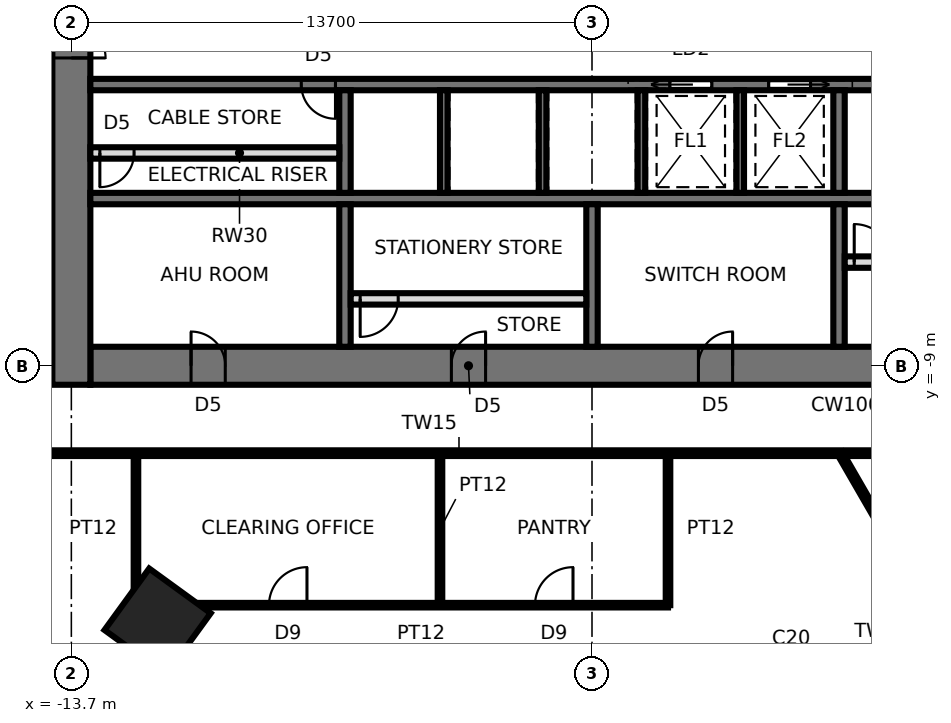
"""IFC4 building model, lengths in metres.
Left out: names, types, materials, properties, quantities, classifications, styles, units other than length and angle.
Written with IfcOpenShell. Run it as: python <this file> out.ifc"""

import sys

from ifc_helpers import new_model, si_unit, direction, frame, frame_2d, origin, origin_2d, place, context, subcontext, project, spatial, rectangle, extrude, element, fill, save


model = new_model("IFC4")
c1 = context("Model", 3, precision=1e-05, world=origin(), true_north=direction((0.0, 1.0)))
c2 = subcontext(c1, "Body", "Model", "MODEL_VIEW")
j1 = project(units=[si_unit("LENGTHUNIT", "METRE"), si_unit("PLANEANGLEUNIT", "RADIAN")], contexts=[c1])
p1 = place(None, origin())
s1 = spatial("IfcSite", under=j1, at=p1, CompositionType="ELEMENT")
p2 = place(p1, origin())
s2 = spatial("IfcBuilding", under=s1, at=p2, CompositionType="ELEMENT")
p3 = place(p2, frame((0.0, 0.0, 82.6)))
s3 = spatial("IfcBuildingStorey", under=s2, at=p3, CompositionType="ELEMENT", Elevation=82.6)
p4 = place(p3, frame((-11.43, -15.733, 0.0), z_axis=(0.0, 0.0, 1.0), x_axis=(-0.587785252292, -0.809016994375, 0.0)))
e1 = element("IfcColumn", 1, at=p4, inside=s3, PredefinedType="COLUMN", context=c2, shape_type="SweptSolid", body=[
    extrude(rectangle(XDim=2.0, YDim=2.0, at=origin_2d()), origin(), (0.0, 0.0, 1.0), 4.2),
])
p5 = place(p3, frame((-13.2, -9.0, 0.0), z_axis=(0.0, 0.0, 1.0), x_axis=(1.0, 0.0, 0.0)))
e2 = element("IfcWall", 2, at=p5, inside=s3, PredefinedType="SHEAR", context=c2, shape_type="SweptSolid", body=[
    extrude(rectangle(XDim=26.4, YDim=1.0, at=frame_2d((13.2, 0.0))), origin(), (0.0, 0.0, 1.0), 4.2),
])
p6 = place(p5, frame((2.65, 0.0, 0.0)))
e3 = element("IfcOpeningElement", 3, at=p6, cuts=e2, PredefinedType="OPENING", context=c2, shape_type="SweptSolid", body=[
    extrude(rectangle(XDim=0.9, YDim=2.1, at=frame_2d((0.45, 1.05))), frame((0.0, 0.51, 0.0), z_axis=(0.0, -1.0, 0.0), x_axis=(1.0, 0.0, 0.0)), (0.0, 0.0, 1.0), 1.02),
])
p7 = place(p5, frame((9.5, 0.0, 0.0)))
e4 = element("IfcOpeningElement", 4, at=p7, cuts=e2, PredefinedType="OPENING", context=c2, shape_type="SweptSolid", body=[
    extrude(rectangle(XDim=0.9, YDim=2.1, at=frame_2d((0.45, 1.05))), frame((0.0, 0.51, 0.0), z_axis=(0.0, -1.0, 0.0), x_axis=(1.0, 0.0, 0.0)), (0.0, 0.0, 1.0), 1.02),
])
p8 = place(p5, frame((16.0, 0.0, 0.0)))
e5 = element("IfcOpeningElement", 5, at=p8, cuts=e2, PredefinedType="OPENING", context=c2, shape_type="SweptSolid", body=[
    extrude(rectangle(XDim=0.9, YDim=2.1, at=frame_2d((0.45, 1.05))), frame((0.0, 0.51, 0.0), z_axis=(0.0, -1.0, 0.0), x_axis=(1.0, 0.0, 0.0)), (0.0, 0.0, 1.0), 1.02),
])
p9 = place(p5, frame((22.85, 0.0, 0.0)))
e6 = element("IfcOpeningElement", 6, at=p9, cuts=e2, PredefinedType="OPENING", context=c2, shape_type="SweptSolid", body=[
    extrude(rectangle(XDim=0.9, YDim=2.1, at=frame_2d((0.45, 1.05))), frame((0.0, 0.51, 0.0), z_axis=(0.0, -1.0, 0.0), x_axis=(1.0, 0.0, 0.0)), (0.0, 0.0, 1.0), 1.02),
])
p10 = place(p3, frame((-13.7, 9.5, 0.0), z_axis=(0.0, 0.0, 1.0), x_axis=(0.0, -1.0, 0.0)))
e7 = element("IfcWall", 7, at=p10, inside=s3, PredefinedType="SHEAR", context=c2, shape_type="SweptSolid", body=[
    extrude(rectangle(XDim=19.0, YDim=1.0, at=frame_2d((9.5, 0.0))), origin(), (0.0, 0.0, 1.0), 4.2),
])
p11 = place(p10, frame((8.6, 0.0, 0.0)))
e8 = element("IfcOpeningElement", 8, at=p11, cuts=e7, PredefinedType="OPENING", context=c2, shape_type="SweptSolid", body=[
    extrude(rectangle(XDim=1.8, YDim=2.4, at=frame_2d((0.9, 1.2))), frame((0.0, 0.51, 0.0), z_axis=(0.0, -1.0, 0.0), x_axis=(1.0, 0.0, 0.0)), (0.0, 0.0, 1.0), 1.02),
])
p12 = place(p3, frame((-13.2, -1.6, 0.0), z_axis=(0.0, 0.0, 1.0), x_axis=(1.0, 0.0, 0.0)))
e9 = element("IfcWall", 9, at=p12, inside=s3, PredefinedType="SHEAR", context=c2, shape_type="SweptSolid", body=[
    extrude(rectangle(XDim=26.4, YDim=0.3, at=frame_2d((13.2, 0.0))), origin(), (0.0, 0.0, 1.0), 4.2),
])
p13 = place(p12, frame((25.15, 0.0, 0.0)))
e10 = element("IfcOpeningElement", 10, at=p13, cuts=e9, PredefinedType="OPENING", context=c2, shape_type="SweptSolid", body=[
    extrude(rectangle(XDim=1.0, YDim=2.1, at=frame_2d((0.5, 1.05))), frame((0.0, 0.16, 0.0), z_axis=(0.0, -1.0, 0.0), x_axis=(1.0, 0.0, 0.0)), (0.0, 0.0, 1.0), 0.32),
])
p14 = place(p12, frame((15.25, 0.0, 0.0)))
e11 = element("IfcOpeningElement", 11, at=p14, cuts=e9, PredefinedType="OPENING", context=c2, shape_type="SweptSolid", body=[
    extrude(rectangle(XDim=1.1, YDim=2.3, at=frame_2d((0.55, 1.15))), frame((0.0, 0.16, 0.0), z_axis=(0.0, -1.0, 0.0), x_axis=(1.0, 0.0, 0.0)), (0.0, 0.0, 1.0), 0.32),
])
p15 = place(p12, frame((17.85, 0.0, 0.0)))
e12 = element("IfcOpeningElement", 12, at=p15, cuts=e9, PredefinedType="OPENING", context=c2, shape_type="SweptSolid", body=[
    extrude(rectangle(XDim=1.1, YDim=2.3, at=frame_2d((0.55, 1.15))), frame((0.0, 0.16, 0.0), z_axis=(0.0, -1.0, 0.0), x_axis=(1.0, 0.0, 0.0)), (0.0, 0.0, 1.0), 0.32),
])
p16 = place(p12, frame((5.55, 0.0, 0.0)))
e13 = element("IfcOpeningElement", 13, at=p16, cuts=e9, PredefinedType="OPENING", context=c2, shape_type="SweptSolid", body=[
    extrude(rectangle(XDim=0.9, YDim=2.1, at=frame_2d((0.45, 1.05))), frame((0.0, 0.16, 0.0), z_axis=(0.0, -1.0, 0.0), x_axis=(1.0, 0.0, 0.0)), (0.0, 0.0, 1.0), 0.32),
])
p17 = place(p3, frame((-13.2, -4.6, 0.0), z_axis=(0.0, 0.0, 1.0), x_axis=(1.0, 0.0, 0.0)))
e14 = element("IfcWall", 14, at=p17, inside=s3, PredefinedType="SHEAR", context=c2, shape_type="SweptSolid", body=[
    extrude(rectangle(XDim=26.4, YDim=0.3, at=frame_2d((13.2, 0.0))), origin(), (0.0, 0.0, 1.0), 4.2),
])
p18 = place(p3, frame((-6.5, -1.75, 0.0), z_axis=(0.0, 0.0, 1.0), x_axis=(0.0, -1.0, 0.0)))
e15 = element("IfcWall", 15, at=p18, inside=s3, PredefinedType="SHEAR", context=c2, shape_type="SweptSolid", body=[
    extrude(rectangle(XDim=2.7, YDim=0.3, at=frame_2d((1.35, 0.0))), origin(), (0.0, 0.0, 1.0), 4.2),
])
p19 = place(p3, frame((-6.5, -4.75, 0.0), z_axis=(0.0, 0.0, 1.0), x_axis=(0.0, -1.0, 0.0)))
e16 = element("IfcWall", 16, at=p19, inside=s3, PredefinedType="SHEAR", context=c2, shape_type="SweptSolid", body=[
    extrude(rectangle(XDim=3.75, YDim=0.3, at=frame_2d((1.875, 0.0))), origin(), (0.0, 0.0, 1.0), 4.2),
])
p20 = place(p3, frame((6.5, -1.75, 0.0), z_axis=(0.0, 0.0, 1.0), x_axis=(0.0, -1.0, 0.0)))
e17 = element("IfcWall", 17, at=p20, inside=s3, PredefinedType="SHEAR", context=c2, shape_type="SweptSolid", body=[
    extrude(rectangle(XDim=2.7, YDim=0.3, at=frame_2d((1.35, 0.0))), origin(), (0.0, 0.0, 1.0), 4.2),
])
p21 = place(p3, frame((6.5, -4.75, 0.0), z_axis=(0.0, 0.0, 1.0), x_axis=(0.0, -1.0, 0.0)))
e18 = element("IfcWall", 18, at=p21, inside=s3, PredefinedType="SHEAR", context=c2, shape_type="SweptSolid", body=[
    extrude(rectangle(XDim=3.75, YDim=0.3, at=frame_2d((1.875, 0.0))), origin(), (0.0, 0.0, 1.0), 4.2),
])
for number, where, z_axis, x_axis in (
    (19, (-3.9, -1.75, 0.0), (0.0, 0.0, 1.0), (0.0, -1.0, 0.0)),
    (20, (-1.3, -1.75, 0.0), (0.0, 0.0, 1.0), (0.0, -1.0, 0.0)),
    (21, (1.3, -1.75, 0.0), (0.0, 0.0, 1.0), (0.0, -1.0, 0.0)),
    (22, (3.9, -1.75, 0.0), (0.0, 0.0, 1.0), (0.0, -1.0, 0.0)),
):
    element("IfcWall", number, at=place(p3, frame(where, z_axis=z_axis, x_axis=x_axis)), inside=s3, PredefinedType="SHEAR", context=c2, shape_type="SweptSolid", body=[
        extrude(rectangle(XDim=2.7, YDim=0.2, at=frame_2d((1.35, 0.0))), origin(), (0.0, 0.0, 1.0), 4.2),
    ])
p22 = place(p3, frame((0.0, -4.75, 0.0), z_axis=(0.0, 0.0, 1.0), x_axis=(0.0, -1.0, 0.0)))
e23 = element("IfcWall", 23, at=p22, inside=s3, PredefinedType="SHEAR", context=c2, shape_type="SweptSolid", body=[
    extrude(rectangle(XDim=3.75, YDim=0.3, at=frame_2d((1.875, 0.0))), origin(), (0.0, 0.0, 1.0), 4.2),
])
p23 = place(p3, frame((-6.35, -7.24, 0.0), z_axis=(0.0, 0.0, 1.0), x_axis=(1.0, 0.0, 0.0)))
e24 = element("IfcWall", 24, at=p23, inside=s3, PredefinedType="PARTITIONING", context=c2, shape_type="SweptSolid", body=[
    extrude(rectangle(XDim=6.2, YDim=0.3, at=frame_2d((3.1, 0.0))), origin(), (0.0, 0.0, 1.0), 4.0),
])
p24 = place(p23, frame((0.25, 0.0, 0.0)))
e25 = element("IfcOpeningElement", 25, at=p24, cuts=e24, PredefinedType="OPENING", context=c2, shape_type="SweptSolid", body=[
    extrude(rectangle(XDim=1.0, YDim=2.4, at=frame_2d((0.5, 1.2))), frame((0.0, 0.16, 0.0), z_axis=(0.0, -1.0, 0.0), x_axis=(1.0, 0.0, 0.0)), (0.0, 0.0, 1.0), 0.32),
])
p25 = place(p3, frame((6.65, -6.272, 0.0), z_axis=(0.0, 0.0, 1.0), x_axis=(1.0, 0.0, 0.0)))
e26 = element("IfcWall", 26, at=p25, inside=s3, PredefinedType="PARTITIONING", context=c2, shape_type="SweptSolid", body=[
    extrude(rectangle(XDim=6.55, YDim=0.3, at=frame_2d((3.275, 0.0))), origin(), (0.0, 0.0, 1.0), 4.0),
])
p26 = place(p25, frame((0.25, 0.0, 0.0)))
e27 = element("IfcOpeningElement", 27, at=p26, cuts=e26, PredefinedType="OPENING", context=c2, shape_type="SweptSolid", body=[
    extrude(rectangle(XDim=1.0, YDim=2.4, at=frame_2d((0.5, 1.2))), frame((0.0, 0.16, 0.0), z_axis=(0.0, -1.0, 0.0), x_axis=(1.0, 0.0, 0.0)), (0.0, 0.0, 1.0), 0.32),
])
p27 = place(p3, frame((-13.2, -3.4, 0.0), z_axis=(0.0, 0.0, 1.0), x_axis=(1.0, 0.0, 0.0)))
e28 = element("IfcWall", 28, at=p27, inside=s3, PredefinedType="SOLIDWALL", context=c2, shape_type="SweptSolid", body=[
    extrude(rectangle(XDim=6.55, YDim=0.3, at=frame_2d((3.275, 0.0))), origin(), (0.0, 0.0, 1.0), 4.0),
])
p28 = place(p27, frame((0.25, 0.0, 0.0)))
e29 = element("IfcOpeningElement", 29, at=p28, cuts=e28, PredefinedType="OPENING", context=c2, shape_type="SweptSolid", body=[
    extrude(rectangle(XDim=0.9, YDim=2.1, at=frame_2d((0.45, 1.05))), frame((0.0, 0.16, 0.0), z_axis=(0.0, -1.0, 0.0), x_axis=(1.0, 0.0, 0.0)), (0.0, 0.0, 1.0), 0.32),
])
p29 = place(p3, frame((-12.0, -11.3, 0.0), z_axis=(0.0, 0.0, 1.0), x_axis=(0.0, -1.0, 0.0)))
e30 = element("IfcWall", 30, at=p29, inside=s3, PredefinedType="PARTITIONING", context=c2, shape_type="SweptSolid", body=[
    extrude(rectangle(XDim=4.0, YDim=0.12, at=frame_2d((2.0, 0.0))), origin(), (0.0, 0.0, 1.0), 4.0),
])
p30 = place(p3, frame((-12.0, -15.3, 0.0), z_axis=(0.0, 0.0, 1.0), x_axis=(1.0, 0.0, 0.0)))
e31 = element("IfcWall", 31, at=p30, inside=s3, PredefinedType="PARTITIONING", context=c2, shape_type="SweptSolid", body=[
    extrude(rectangle(XDim=14.0, YDim=0.12, at=frame_2d((7.0, 0.0))), origin(), (0.0, 0.0, 1.0), 3.467),
])
p31 = place(p30, frame((3.5, 0.0, 0.0)))
e32 = element("IfcOpeningElement", 32, at=p31, cuts=e31, PredefinedType="OPENING", context=c2, shape_type="SweptSolid", body=[
    extrude(rectangle(XDim=1.0, YDim=2.4, at=frame_2d((0.5, 1.2))), frame((0.0, 0.07, 0.0), z_axis=(0.0, -1.0, 0.0), x_axis=(1.0, 0.0, 0.0)), (0.0, 0.0, 1.0), 0.14),
])
p32 = place(p30, frame((10.5, 0.0, 0.0)))
e33 = element("IfcOpeningElement", 33, at=p32, cuts=e31, PredefinedType="OPENING", context=c2, shape_type="SweptSolid", body=[
    extrude(rectangle(XDim=1.0, YDim=2.4, at=frame_2d((0.5, 1.2))), frame((0.0, 0.07, 0.0), z_axis=(0.0, -1.0, 0.0), x_axis=(1.0, 0.0, 0.0)), (0.0, 0.0, 1.0), 0.14),
])
p33 = place(p3, frame((-16.0, -11.3, 0.0), z_axis=(0.0, 0.0, 1.0), x_axis=(1.0, 0.0, 0.0)))
e34 = element("IfcWall", 34, at=p33, inside=s3, PredefinedType="PARTITIONING", context=c2, shape_type="SweptSolid", body=[
    extrude(rectangle(XDim=25.0, YDim=0.15, at=frame_2d((12.5, 0.0))), origin(), (0.0, 0.0, 1.0), 4.0),
])
for number, where, z_axis, x_axis in (
    (35, (-4.0, -11.3, 0.0), (0.0, 0.0, 1.0), (0.0, -1.0, 0.0)),
    (36, (2.0, -15.3, 0.0), (0.0, 0.0, 1.0), (0.0, 1.0, 0.0)),
):
    element("IfcWall", number, at=place(p3, frame(where, z_axis=z_axis, x_axis=x_axis)), inside=s3, PredefinedType="PARTITIONING", context=c2, shape_type="SweptSolid", body=[
        extrude(rectangle(XDim=4.0, YDim=0.12, at=frame_2d((2.0, 0.0))), origin(), (0.0, 0.0, 1.0), 4.0),
    ])
p34 = place(p3, frame((11.949, -20.697, 0.0), z_axis=(0.0, 0.0, 1.0), x_axis=(-0.499989292232, 0.866031585829, 0.0)))
e37 = element("IfcWall", 37, at=p34, inside=s3, PredefinedType="PARTITIONING", context=c2, shape_type="SweptSolid", body=[
    extrude(rectangle(XDim=10.85, YDim=0.15, at=frame_2d((5.425, 0.0))), origin(), (0.0, 0.0, 1.0), 4.0),
])
p35 = place(p11, origin())
e38 = element("IfcDoor", 38, at=p35, inside=s3, OperationType="DOUBLE_DOOR_SINGLE_SWING", PredefinedType="DOOR", context=c2, shape_type="SweptSolid", body=[
    extrude(rectangle(XDim=1.72, YDim=2.36, at=frame_2d((0.9, 1.18))), frame((0.0, 0.025, 0.0), z_axis=(0.0, -1.0, 0.0), x_axis=(1.0, 0.0, 0.0)), (0.0, 0.0, 1.0), 0.05),
    extrude(rectangle(XDim=0.04, YDim=2.4, at=frame_2d((0.02, 1.2))), frame((0.0, 0.25, 0.0), z_axis=(0.0, -1.0, 0.0), x_axis=(1.0, 0.0, 0.0)), (0.0, 0.0, 1.0), 0.5),
    extrude(rectangle(XDim=0.04, YDim=2.4, at=frame_2d((1.78, 1.2))), frame((0.0, 0.25, 0.0), z_axis=(0.0, -1.0, 0.0), x_axis=(1.0, 0.0, 0.0)), (0.0, 0.0, 1.0), 0.5),
    extrude(rectangle(XDim=1.72, YDim=0.04, at=frame_2d((0.9, 2.38))), frame((0.0, 0.25, 0.0), z_axis=(0.0, -1.0, 0.0), x_axis=(1.0, 0.0, 0.0)), (0.0, 0.0, 1.0), 0.5),
])
fill(e8, e38)
p36 = place(p14, frame((1.1, 0.0, 0.0), z_axis=(0.0, 0.0, 1.0), x_axis=(-1.0, 0.0, 0.0)))
e39 = element("IfcDoor", 39, at=p36, inside=s3, OperationType="SLIDING_TO_RIGHT", PredefinedType="DOOR", context=c2, shape_type="SweptSolid", body=[
    extrude(rectangle(XDim=1.1, YDim=2.3, at=frame_2d((0.55, 1.15))), frame((0.0, 0.025, 0.0), z_axis=(0.0, -1.0, 0.0), x_axis=(1.0, 0.0, 0.0)), (0.0, 0.0, 1.0), 0.05),
])
fill(e11, e39)
p37 = place(p15, frame((1.1, 0.0, 0.0), z_axis=(0.0, 0.0, 1.0), x_axis=(-1.0, 0.0, 0.0)))
e40 = element("IfcDoor", 40, at=p37, inside=s3, OperationType="SLIDING_TO_LEFT", PredefinedType="DOOR", context=c2, shape_type="SweptSolid", body=[
    extrude(rectangle(XDim=1.1, YDim=2.3, at=frame_2d((0.55, 1.15))), frame((0.0, 0.025, 0.0), z_axis=(0.0, -1.0, 0.0), x_axis=(1.0, 0.0, 0.0)), (0.0, 0.0, 1.0), 0.05),
])
fill(e12, e40)
p38 = place(p16, frame((0.9, 0.0, 0.0), z_axis=(0.0, 0.0, 1.0), x_axis=(-1.0, 0.0, 0.0)))
e41 = element("IfcDoor", 41, at=p38, inside=s3, OperationType="SINGLE_SWING_LEFT", PredefinedType="DOOR", context=c2, shape_type="SweptSolid", body=[
    extrude(rectangle(XDim=0.9, YDim=2.1, at=frame_2d((0.45, 1.05))), frame((0.0, 0.025, 0.0), z_axis=(0.0, -1.0, 0.0), x_axis=(1.0, 0.0, 0.0)), (0.0, 0.0, 1.0), 0.05),
])
fill(e13, e41)
p39 = place(p6, origin())
e42 = element("IfcDoor", 42, at=p39, inside=s3, OperationType="SINGLE_SWING_LEFT", PredefinedType="DOOR", context=c2, shape_type="SweptSolid", body=[
    extrude(rectangle(XDim=0.82, YDim=2.06, at=frame_2d((0.45, 1.03))), frame((0.0, 0.025, 0.0), z_axis=(0.0, -1.0, 0.0), x_axis=(1.0, 0.0, 0.0)), (0.0, 0.0, 1.0), 0.05),
    extrude(rectangle(XDim=0.04, YDim=2.1, at=frame_2d((0.02, 1.05))), frame((0.0, 0.25, 0.0), z_axis=(0.0, -1.0, 0.0), x_axis=(1.0, 0.0, 0.0)), (0.0, 0.0, 1.0), 0.5),
    extrude(rectangle(XDim=0.04, YDim=2.1, at=frame_2d((0.88, 1.05))), frame((0.0, 0.25, 0.0), z_axis=(0.0, -1.0, 0.0), x_axis=(1.0, 0.0, 0.0)), (0.0, 0.0, 1.0), 0.5),
    extrude(rectangle(XDim=0.82, YDim=0.04, at=frame_2d((0.45, 2.08))), frame((0.0, 0.25, 0.0), z_axis=(0.0, -1.0, 0.0), x_axis=(1.0, 0.0, 0.0)), (0.0, 0.0, 1.0), 0.5),
])
fill(e3, e42)
p40 = place(p7, origin())
e43 = element("IfcDoor", 43, at=p40, inside=s3, OperationType="SINGLE_SWING_RIGHT", PredefinedType="DOOR", context=c2, shape_type="SweptSolid", body=[
    extrude(rectangle(XDim=0.82, YDim=2.06, at=frame_2d((0.45, 1.03))), frame((0.0, 0.025, 0.0), z_axis=(0.0, -1.0, 0.0), x_axis=(1.0, 0.0, 0.0)), (0.0, 0.0, 1.0), 0.05),
    extrude(rectangle(XDim=0.04, YDim=2.1, at=frame_2d((0.02, 1.05))), frame((0.0, 0.25, 0.0), z_axis=(0.0, -1.0, 0.0), x_axis=(1.0, 0.0, 0.0)), (0.0, 0.0, 1.0), 0.5),
    extrude(rectangle(XDim=0.04, YDim=2.1, at=frame_2d((0.88, 1.05))), frame((0.0, 0.25, 0.0), z_axis=(0.0, -1.0, 0.0), x_axis=(1.0, 0.0, 0.0)), (0.0, 0.0, 1.0), 0.5),
    extrude(rectangle(XDim=0.82, YDim=0.04, at=frame_2d((0.45, 2.08))), frame((0.0, 0.25, 0.0), z_axis=(0.0, -1.0, 0.0), x_axis=(1.0, 0.0, 0.0)), (0.0, 0.0, 1.0), 0.5),
])
fill(e4, e43)
p41 = place(p8, origin())
e44 = element("IfcDoor", 44, at=p41, inside=s3, OperationType="SINGLE_SWING_RIGHT", PredefinedType="DOOR", context=c2, shape_type="SweptSolid", body=[
    extrude(rectangle(XDim=0.82, YDim=2.06, at=frame_2d((0.45, 1.03))), frame((0.0, 0.025, 0.0), z_axis=(0.0, -1.0, 0.0), x_axis=(1.0, 0.0, 0.0)), (0.0, 0.0, 1.0), 0.05),
    extrude(rectangle(XDim=0.04, YDim=2.1, at=frame_2d((0.02, 1.05))), frame((0.0, 0.25, 0.0), z_axis=(0.0, -1.0, 0.0), x_axis=(1.0, 0.0, 0.0)), (0.0, 0.0, 1.0), 0.5),
    extrude(rectangle(XDim=0.04, YDim=2.1, at=frame_2d((0.88, 1.05))), frame((0.0, 0.25, 0.0), z_axis=(0.0, -1.0, 0.0), x_axis=(1.0, 0.0, 0.0)), (0.0, 0.0, 1.0), 0.5),
    extrude(rectangle(XDim=0.82, YDim=0.04, at=frame_2d((0.45, 2.08))), frame((0.0, 0.25, 0.0), z_axis=(0.0, -1.0, 0.0), x_axis=(1.0, 0.0, 0.0)), (0.0, 0.0, 1.0), 0.5),
])
fill(e5, e44)
p42 = place(p24, frame((1.0, 0.0, 0.0), z_axis=(0.0, 0.0, 1.0), x_axis=(-1.0, 0.0, 0.0)))
e45 = element("IfcDoor", 45, at=p42, inside=s3, OperationType="SINGLE_SWING_RIGHT", PredefinedType="DOOR", context=c2, shape_type="SweptSolid", body=[
    extrude(rectangle(XDim=1.0, YDim=2.4, at=frame_2d((0.5, 1.2))), frame((0.0, 0.025, 0.0), z_axis=(0.0, -1.0, 0.0), x_axis=(1.0, 0.0, 0.0)), (0.0, 0.0, 1.0), 0.05),
])
fill(e25, e45)
p43 = place(p26, origin())
e46 = element("IfcDoor", 46, at=p43, inside=s3, OperationType="SINGLE_SWING_LEFT", PredefinedType="DOOR", context=c2, shape_type="SweptSolid", body=[
    extrude(rectangle(XDim=1.0, YDim=2.4, at=frame_2d((0.5, 1.2))), frame((0.0, 0.025, 0.0), z_axis=(0.0, -1.0, 0.0), x_axis=(1.0, 0.0, 0.0)), (0.0, 0.0, 1.0), 0.05),
])
fill(e27, e46)
p44 = place(p28, frame((0.9, 0.0, 0.0), z_axis=(0.0, 0.0, 1.0), x_axis=(-1.0, 0.0, 0.0)))
e47 = element("IfcDoor", 47, at=p44, inside=s3, OperationType="SINGLE_SWING_RIGHT", PredefinedType="DOOR", context=c2, shape_type="SweptSolid", body=[
    extrude(rectangle(XDim=0.9, YDim=2.1, at=frame_2d((0.45, 1.05))), frame((0.0, 0.025, 0.0), z_axis=(0.0, -1.0, 0.0), x_axis=(1.0, 0.0, 0.0)), (0.0, 0.0, 1.0), 0.05),
])
fill(e29, e47)
p45 = place(p31, origin())
e48 = element("IfcDoor", 48, at=p45, inside=s3, OperationType="SINGLE_SWING_RIGHT", PredefinedType="DOOR", context=c2, shape_type="SweptSolid", body=[
    extrude(rectangle(XDim=1.0, YDim=2.4, at=frame_2d((0.5, 1.2))), frame((0.0, 0.025, 0.0), z_axis=(0.0, -1.0, 0.0), x_axis=(1.0, 0.0, 0.0)), (0.0, 0.0, 1.0), 0.05),
])
fill(e32, e48)
p46 = place(p32, origin())
e49 = element("IfcDoor", 49, at=p46, inside=s3, OperationType="SINGLE_SWING_RIGHT", PredefinedType="DOOR", context=c2, shape_type="SweptSolid", body=[
    extrude(rectangle(XDim=1.0, YDim=2.4, at=frame_2d((0.5, 1.2))), frame((0.0, 0.025, 0.0), z_axis=(0.0, -1.0, 0.0), x_axis=(1.0, 0.0, 0.0)), (0.0, 0.0, 1.0), 0.05),
])
fill(e33, e49)
save(model, sys.argv[1])
